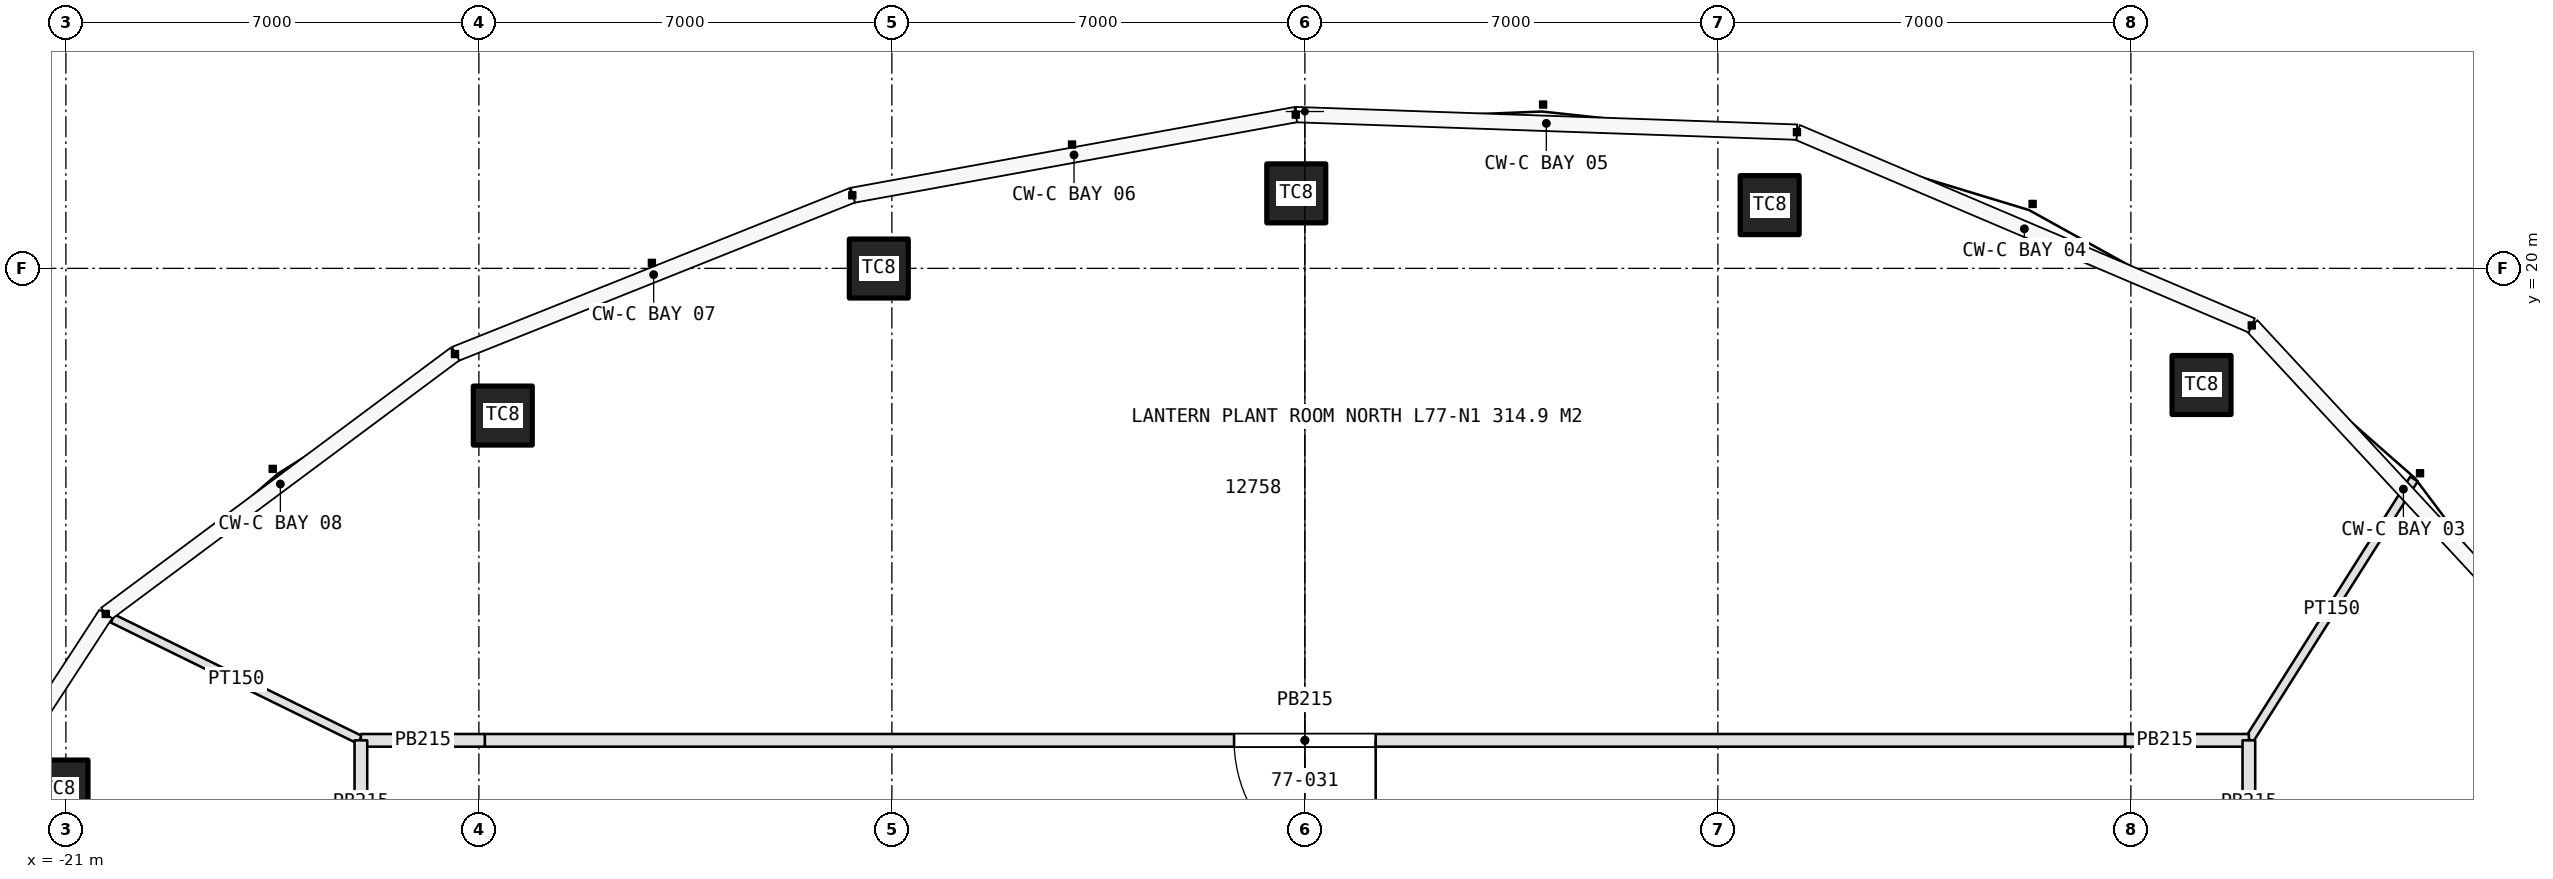
"""IFC4 building model, lengths in metres.
Left out: names, types, materials, properties, quantities, classifications, styles, units other than length and angle.
Written with IfcOpenShell. Run it as: python <this file> out.ifc"""

import sys

from ifc_helpers import new_model, si_unit, direction, frame, frame_2d, origin, origin_2d, place, context, subcontext, project, spatial, rectangle, extrude, element, fill, save


model = new_model("IFC4")
c1 = context("Model", 3, precision=1e-05, world=origin(), true_north=direction((0.0, 1.0)))
c2 = subcontext(c1, "Body", "Model", "MODEL_VIEW")
j1 = project(units=[si_unit("LENGTHUNIT", "METRE"), si_unit("PLANEANGLEUNIT", "RADIAN")], contexts=[c1])
p1 = place(None, origin())
s1 = spatial("IfcSite", under=j1, at=p1, CompositionType="ELEMENT")
p2 = place(p1, origin())
s2 = spatial("IfcBuilding", under=s1, at=p2, CompositionType="ELEMENT")
p3 = place(p2, frame((0.0, 0.0, 344.2)))
s3 = spatial("IfcBuildingStorey", under=s2, at=p3, CompositionType="ELEMENT", Elevation=344.2)
for number, where, z_axis, x_axis in (
    (1, (15.198, 18.023, 0.0), (0.0, 0.0, 1.0), (1.0, 0.0, 0.0)),
    (2, (7.878, 21.072, 0.0), (0.0, 0.0, 1.0), (1.0, 0.0, 0.0)),
    (3, (-0.146, 21.271, 0.0), (0.0, 0.0, 1.0), (1.0, 0.0, 0.0)),
    (4, (-7.222, 19.997, 0.0), (0.0, 0.0, 1.0), (1.0, 0.0, 0.0)),
    (5, (-13.595, 17.505, 0.0), (0.0, 0.0, 1.0), (1.0, 0.0, 0.0)),
    (6, (-21.125, 11.166, 0.0), (0.0, 0.0, 1.0), (1.0, 0.0, 0.0)),
):
    element("IfcColumn", number, at=place(p3, frame(where, z_axis=z_axis, x_axis=x_axis)), inside=s3, PredefinedType="COLUMN", context=c2, shape_type="SweptSolid", body=[
        extrude(rectangle(XDim=1.0, YDim=1.0, at=origin_2d()), origin(), (0.0, 0.0, 1.0), 5.0),
    ])
p4 = place(p3, frame((-16.018, 12.009, 0.0), z_axis=(0.0, 0.0, 1.0), x_axis=(-0.897771840996, 0.440460805879, 0.0)))
e7 = element("IfcWall", 7, at=p4, inside=s3, PredefinedType="PARTITIONING", context=c2, shape_type="SweptSolid", body=[
    extrude(rectangle(XDim=4.666, YDim=0.15, at=frame_2d((2.333, 0.0))), origin(), (0.0, 0.0, 1.0), 4.2),
])
p5 = place(p3, frame((16.011, 12.017, 0.0), z_axis=(0.0, 0.0, 1.0), x_axis=(0.53415837449, 0.845384427916, 0.0)))
e8 = element("IfcWall", 8, at=p5, inside=s3, PredefinedType="PARTITIONING", context=c2, shape_type="SweptSolid", body=[
    extrude(rectangle(XDim=5.22, YDim=0.15, at=frame_2d((2.61, 0.0))), origin(), (0.0, 0.0, 1.0), 4.2),
])
p6 = place(p3, frame((16.0, 12.0, 0.0), z_axis=(0.0, 0.0, 1.0), x_axis=(-1.0, 0.0, 0.0)))
e9 = element("IfcWall", 9, at=p6, inside=s3, PredefinedType="PARTITIONING", context=c2, shape_type="SweptSolid", body=[
    extrude(rectangle(XDim=2.1, YDim=0.215, at=frame_2d((1.05, 0.0))), origin(), (0.0, 0.0, 1.0), 4.2),
])
p7 = place(p3, frame((13.9, 12.0, 0.0), z_axis=(0.0, 0.0, 1.0), x_axis=(-1.0, 0.0, 0.0)))
e10 = element("IfcWall", 10, at=p7, inside=s3, PredefinedType="PARTITIONING", context=c2, shape_type="SweptSolid", body=[
    extrude(rectangle(XDim=27.8, YDim=0.215, at=frame_2d((13.9, 0.0))), origin(), (0.0, 0.0, 1.0), 4.2),
])
p8 = place(p7, frame((12.7, 0.0, 0.0)))
e11 = element("IfcOpeningElement", 11, at=p8, cuts=e10, PredefinedType="OPENING", context=c2, shape_type="SweptSolid", body=[
    extrude(rectangle(XDim=2.4, YDim=2.4, at=frame_2d((1.2, 1.2))), frame((0.0, 0.118, 0.0), z_axis=(0.0, -1.0, 0.0), x_axis=(1.0, 0.0, 0.0)), (0.0, 0.0, 1.0), 0.235),
])
for number, where, z_axis, x_axis in (
    (12, (-13.9, 12.0, 0.0), (0.0, 0.0, 1.0), (-1.0, 0.0, 0.0)),
    (13, (16.0, 9.9, 0.0), (0.0, 0.0, 1.0), (0.0, 1.0, 0.0)),
    (14, (-16.0, 12.0, 0.0), (0.0, 0.0, 1.0), (0.0, -1.0, 0.0)),
):
    element("IfcWall", number, at=place(p3, frame(where, z_axis=z_axis, x_axis=x_axis)), inside=s3, PredefinedType="PARTITIONING", context=c2, shape_type="SweptSolid", body=[
        extrude(rectangle(XDim=2.1, YDim=0.215, at=frame_2d((1.05, 0.0))), origin(), (0.0, 0.0, 1.0), 4.2),
    ])
p9 = place(p8, origin())
e15 = element("IfcDoor", 15, at=p9, inside=s3, OperationType="DOUBLE_DOOR_SINGLE_SWING", PredefinedType="DOOR", context=c2, shape_type="SweptSolid", body=[
    extrude(rectangle(XDim=2.4, YDim=2.4, at=frame_2d((1.2, 1.2))), frame((0.0, 0.025, 0.0), z_axis=(0.0, -1.0, 0.0), x_axis=(1.0, 0.0, 0.0)), (0.0, 0.0, 1.0), 0.05),
])
fill(e11, e15)
save(model, sys.argv[1])
